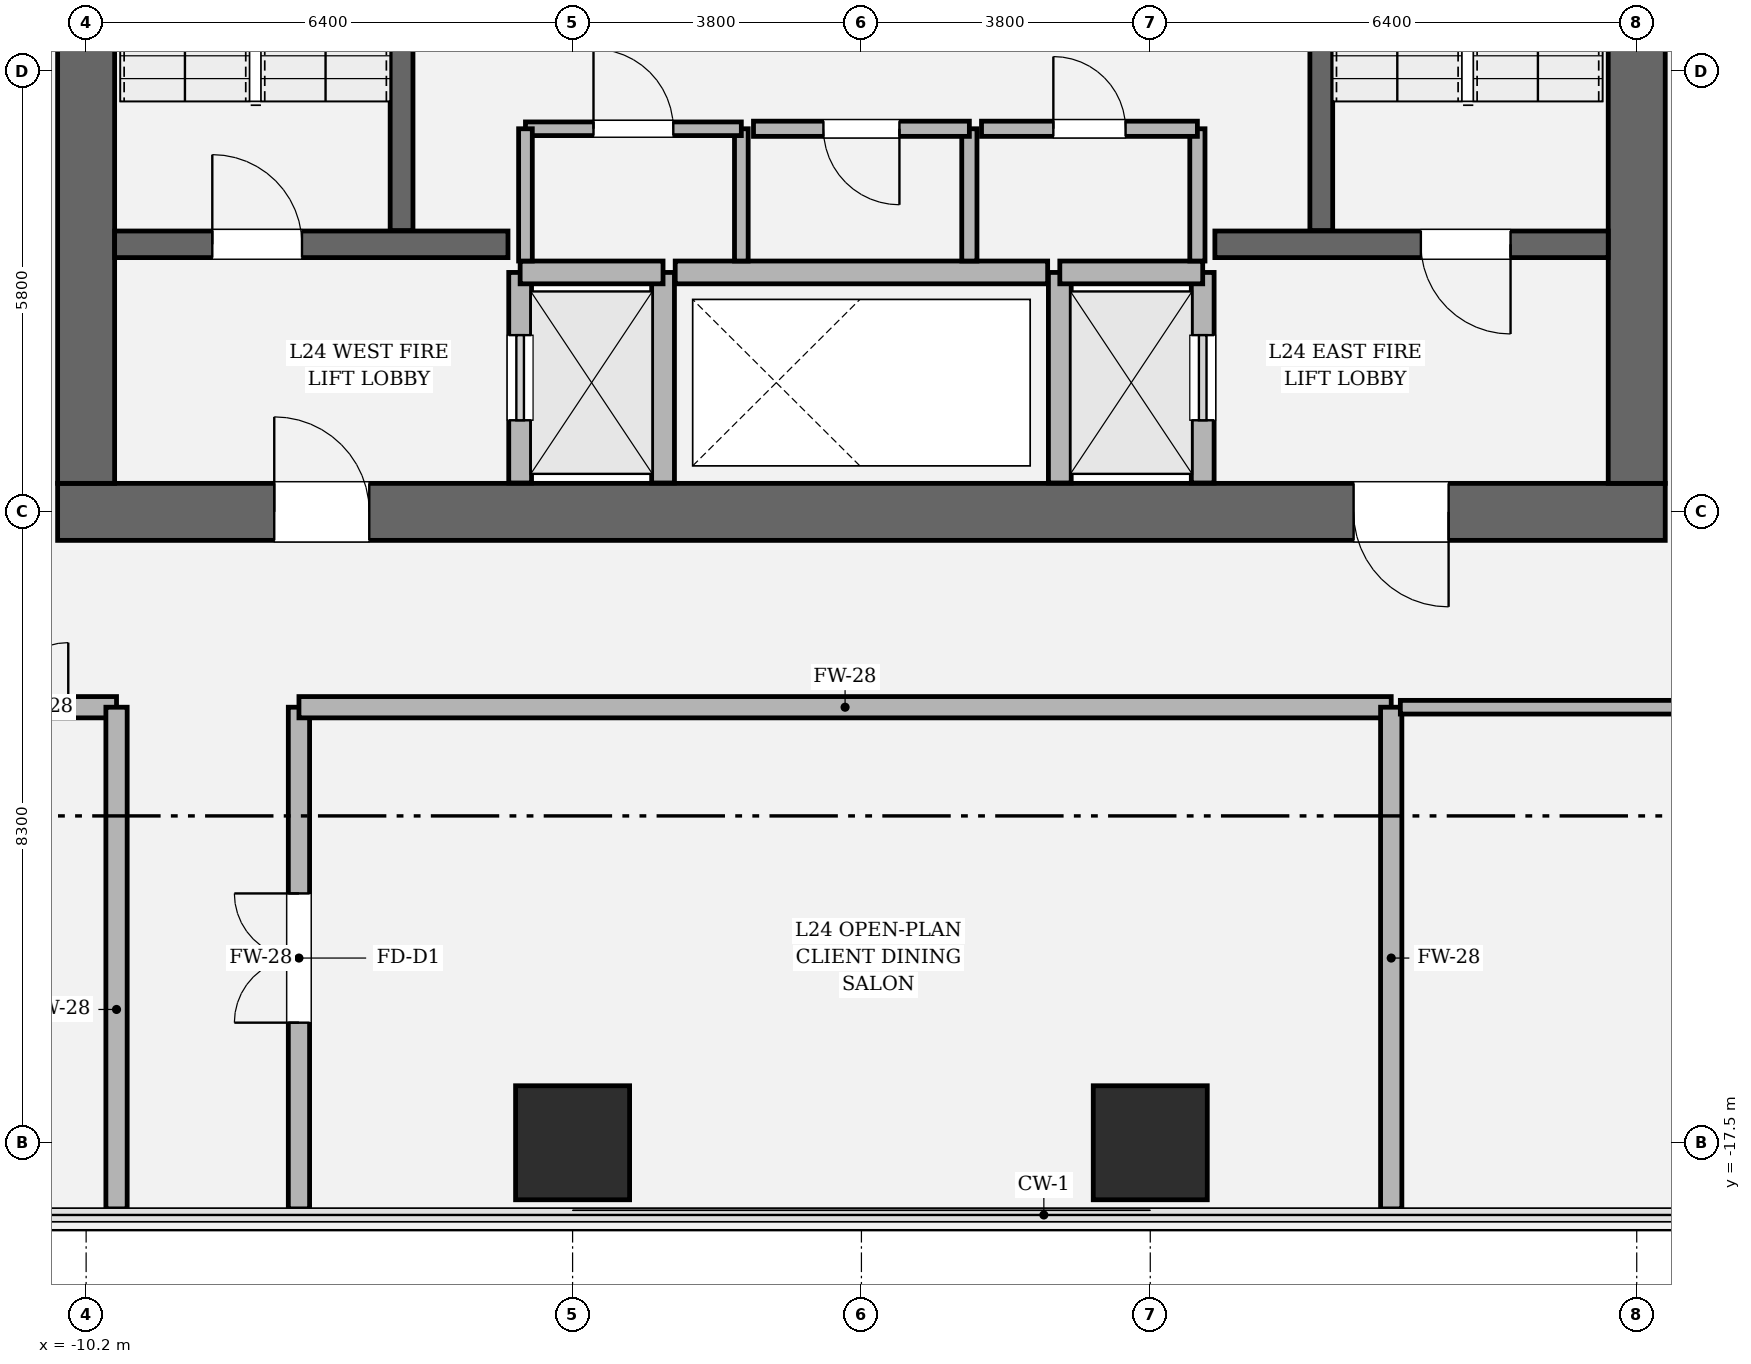
"""IFC4 building model, lengths in metres.
Left out: names, types, materials, properties, quantities, classifications, styles, units other than length and angle.
Written with IfcOpenShell. Run it as: python <this file> out.ifc"""

import sys

from ifc_helpers import new_model, si_unit, direction, frame, frame_2d, origin, origin_2d, place, context, subcontext, project, spatial, rectangle, hollow_rectangle, extrude, element, fill, save


model = new_model("IFC4")
c1 = context("Model", 3, precision=1e-05, world=origin(), true_north=direction((0.0, 1.0)))
c2 = subcontext(c1, "Body", "Model", "MODEL_VIEW")
j1 = project(units=[si_unit("LENGTHUNIT", "METRE"), si_unit("PLANEANGLEUNIT", "RADIAN")], contexts=[c1])
p1 = place(None, origin())
s1 = spatial("IfcSite", under=j1, at=p1, CompositionType="ELEMENT")
p2 = place(p1, origin())
s2 = spatial("IfcBuilding", under=s1, at=p2, CompositionType="ELEMENT")
p3 = place(p2, frame((0.0, 0.0, 105.15)))
s3 = spatial("IfcBuildingStorey", under=s2, at=p3, CompositionType="ELEMENT", Elevation=105.15)
p4 = place(p3, frame((10.575, -9.2, 0.0), z_axis=(0.0, 0.0, 1.0), x_axis=(-1.0, 0.0, 0.0)))
e1 = element("IfcWall", 1, at=p4, inside=s3, PredefinedType="SHEAR", context=c2, shape_type="SweptSolid", body=[
    extrude(rectangle(XDim=21.15, YDim=0.75, at=frame_2d((10.575, 0.0))), origin(), (0.0, 0.0, 1.0), 4.05),
])
p5 = place(p4, frame((2.85, 0.0, 0.0)))
e2 = element("IfcOpeningElement", 2, at=p5, cuts=e1, PredefinedType="OPENING", context=c2, shape_type="SweptSolid", body=[
    extrude(rectangle(XDim=1.25, YDim=2.25, at=frame_2d((0.625, 1.125))), frame((0.0, 0.385, 0.0), z_axis=(0.0, -1.0, 0.0), x_axis=(1.0, 0.0, 0.0)), (0.0, 0.0, 1.0), 0.77),
])
p6 = place(p4, frame((17.05, 0.0, 0.0)))
e3 = element("IfcOpeningElement", 3, at=p6, cuts=e1, PredefinedType="OPENING", context=c2, shape_type="SweptSolid", body=[
    extrude(rectangle(XDim=1.25, YDim=2.25, at=frame_2d((0.625, 1.125))), frame((0.0, 0.385, 0.0), z_axis=(0.0, -1.0, 0.0), x_axis=(1.0, 0.0, 0.0)), (0.0, 0.0, 1.0), 0.77),
])
p7 = place(p3, frame((-10.2, -8.825, 0.0), z_axis=(0.0, 0.0, 1.0), x_axis=(0.0, 1.0, 0.0)))
e4 = element("IfcWall", 4, at=p7, inside=s3, PredefinedType="SHEAR", context=c2, shape_type="SweptSolid", body=[
    extrude(rectangle(XDim=17.65, YDim=0.75, at=frame_2d((8.825, 0.0))), origin(), (0.0, 0.0, 1.0), 4.05),
])
p8 = place(p7, frame((12.615, 0.0, 0.0)))
e5 = element("IfcOpeningElement", 5, at=p8, cuts=e4, PredefinedType="OPENING", context=c2, shape_type="SweptSolid", body=[
    extrude(rectangle(XDim=1.18, YDim=2.2, at=frame_2d((0.59, 1.1))), frame((0.0, 0.385, 0.0), z_axis=(0.0, -1.0, 0.0), x_axis=(1.0, 0.0, 0.0)), (0.0, 0.0, 1.0), 0.77),
])
p9 = place(p3, frame((10.2, 8.825, 0.0), z_axis=(0.0, 0.0, 1.0), x_axis=(0.0, -1.0, 0.0)))
e6 = element("IfcWall", 6, at=p9, inside=s3, PredefinedType="SHEAR", context=c2, shape_type="SweptSolid", body=[
    extrude(rectangle(XDim=17.65, YDim=0.75, at=frame_2d((8.825, 0.0))), origin(), (0.0, 0.0, 1.0), 4.05),
])
p10 = place(p9, frame((3.855, 0.0, 0.0)))
e7 = element("IfcOpeningElement", 7, at=p10, cuts=e6, PredefinedType="OPENING", context=c2, shape_type="SweptSolid", body=[
    extrude(rectangle(XDim=1.18, YDim=2.2, at=frame_2d((0.59, 1.1))), frame((0.0, 0.385, 0.0), z_axis=(0.0, -1.0, 0.0), x_axis=(1.0, 0.0, 0.0)), (0.0, 0.0, 1.0), 0.77),
])
for number, where, z_axis, x_axis in (
    (8, (-6.05, -5.5, 0.0), (0.0, 0.0, 1.0), (0.0, 1.0, 0.0)),
    (9, (6.05, 3.45, 0.0), (0.0, 0.0, 1.0), (0.0, -1.0, 0.0)),
):
    element("IfcWall", number, at=place(p3, frame(where, z_axis=z_axis, x_axis=x_axis)), inside=s3, PredefinedType="SOLIDWALL", context=c2, shape_type="SweptSolid", body=[
        extrude(rectangle(XDim=8.95, YDim=0.3, at=frame_2d((4.475, 0.0))), origin(), (0.0, 0.0, 1.0), 4.05),
    ])
p11 = place(p3, frame((-9.825, -5.68, 0.0), z_axis=(0.0, 0.0, 1.0), x_axis=(1.0, 0.0, 0.0)))
e10 = element("IfcWall", 10, at=p11, inside=s3, PredefinedType="SOLIDWALL", context=c2, shape_type="SweptSolid", body=[
    extrude(rectangle(XDim=5.175, YDim=0.35, at=frame_2d((2.587, 0.0))), origin(), (0.0, 0.0, 1.0), 4.05),
])
p12 = place(p11, frame((1.285, 0.0, 0.0)))
e11 = element("IfcOpeningElement", 11, at=p12, cuts=e10, PredefinedType="OPENING", context=c2, shape_type="SweptSolid", body=[
    extrude(rectangle(XDim=1.18, YDim=2.2, at=frame_2d((0.59, 1.1))), frame((0.0, 0.185, 0.0), z_axis=(0.0, -1.0, 0.0), x_axis=(1.0, 0.0, 0.0)), (0.0, 0.0, 1.0), 0.37),
])
p13 = place(p3, frame((4.65, -5.68, 0.0), z_axis=(0.0, 0.0, 1.0), x_axis=(1.0, 0.0, 0.0)))
e12 = element("IfcWall", 12, at=p13, inside=s3, PredefinedType="SOLIDWALL", context=c2, shape_type="SweptSolid", body=[
    extrude(rectangle(XDim=5.175, YDim=0.35, at=frame_2d((2.587, 0.0))), origin(), (0.0, 0.0, 1.0), 4.05),
])
p14 = place(p13, frame((2.71, 0.0, 0.0)))
e13 = element("IfcOpeningElement", 13, at=p14, cuts=e12, PredefinedType="OPENING", context=c2, shape_type="SweptSolid", body=[
    extrude(rectangle(XDim=1.18, YDim=2.2, at=frame_2d((0.59, 1.1))), frame((0.0, 0.185, 0.0), z_axis=(0.0, -1.0, 0.0), x_axis=(1.0, 0.0, 0.0)), (0.0, 0.0, 1.0), 0.37),
])
for number, where, z_axis, x_axis in (
    (14, (-3.8, -17.5, 0.0), (0.0, 0.0, 1.0), (1.0, 0.0, 0.0)),
    (15, (3.8, -17.5, 0.0), (0.0, 0.0, 1.0), (1.0, 0.0, 0.0)),
):
    element("IfcColumn", number, at=place(p3, frame(where, z_axis=z_axis, x_axis=x_axis)), inside=s3, PredefinedType="COLUMN", context=c2, shape_type="SweptSolid", body=[
        extrude(hollow_rectangle(XDim=1.5, YDim=1.5, WallThickness=0.045, at=origin_2d()), origin(), (0.0, 0.0, 1.0), 4.05),
    ])
p15 = place(p3, frame((-4.49, -8.82, 0.0), z_axis=(0.0, 0.0, 1.0), x_axis=(0.0, 1.0, 0.0)))
e16 = element("IfcWall", 16, at=p15, inside=s3, PredefinedType="SOLIDWALL", context=c2, shape_type="SweptSolid", body=[
    extrude(rectangle(XDim=2.77, YDim=0.3, at=frame_2d((1.385, 0.0))), origin(), (0.0, 0.0, 1.0), 3.81),
])
p16 = place(p15, frame((0.825, 0.0, 0.0)))
e17 = element("IfcOpeningElement", 17, at=p16, cuts=e16, PredefinedType="OPENING", context=c2, shape_type="SweptSolid", body=[
    extrude(rectangle(XDim=1.12, YDim=2.25, at=frame_2d((0.56, 1.125))), frame((0.0, 0.16, 0.0), z_axis=(0.0, -1.0, 0.0), x_axis=(1.0, 0.0, 0.0)), (0.0, 0.0, 1.0), 0.32),
])
p17 = place(p3, frame((-2.61, -8.82, 0.0), z_axis=(0.0, 0.0, 1.0), x_axis=(0.0, 1.0, 0.0)))
e18 = element("IfcWall", 18, at=p17, inside=s3, PredefinedType="SOLIDWALL", context=c2, shape_type="SweptSolid", body=[
    extrude(rectangle(XDim=2.77, YDim=0.3, at=frame_2d((1.385, 0.0))), origin(), (0.0, 0.0, 1.0), 3.81),
])
p18 = place(p3, frame((-4.49, -6.05, 0.0), z_axis=(0.0, 0.0, 1.0), x_axis=(1.0, 0.0, 0.0)))
e19 = element("IfcWall", 19, at=p18, inside=s3, PredefinedType="SOLIDWALL", context=c2, shape_type="SweptSolid", body=[
    extrude(rectangle(XDim=1.88, YDim=0.3, at=frame_2d((0.94, 0.0))), origin(), (0.0, 0.0, 1.0), 3.81),
])
p19 = place(p3, frame((4.49, -8.82, 0.0), z_axis=(0.0, 0.0, 1.0), x_axis=(0.0, 1.0, 0.0)))
e20 = element("IfcWall", 20, at=p19, inside=s3, PredefinedType="SOLIDWALL", context=c2, shape_type="SweptSolid", body=[
    extrude(rectangle(XDim=2.77, YDim=0.3, at=frame_2d((1.385, 0.0))), origin(), (0.0, 0.0, 1.0), 3.81),
])
p20 = place(p19, frame((0.825, 0.0, 0.0)))
e21 = element("IfcOpeningElement", 21, at=p20, cuts=e20, PredefinedType="OPENING", context=c2, shape_type="SweptSolid", body=[
    extrude(rectangle(XDim=1.12, YDim=2.25, at=frame_2d((0.56, 1.125))), frame((0.0, 0.16, 0.0), z_axis=(0.0, -1.0, 0.0), x_axis=(1.0, 0.0, 0.0)), (0.0, 0.0, 1.0), 0.32),
])
p21 = place(p3, frame((2.61, -8.82, 0.0), z_axis=(0.0, 0.0, 1.0), x_axis=(0.0, 1.0, 0.0)))
e22 = element("IfcWall", 22, at=p21, inside=s3, PredefinedType="SOLIDWALL", context=c2, shape_type="SweptSolid", body=[
    extrude(rectangle(XDim=2.77, YDim=0.3, at=frame_2d((1.385, 0.0))), origin(), (0.0, 0.0, 1.0), 3.81),
])
p22 = place(p3, frame((2.61, -6.05, 0.0), z_axis=(0.0, 0.0, 1.0), x_axis=(1.0, 0.0, 0.0)))
e23 = element("IfcWall", 23, at=p22, inside=s3, PredefinedType="SOLIDWALL", context=c2, shape_type="SweptSolid", body=[
    extrude(rectangle(XDim=1.88, YDim=0.3, at=frame_2d((0.94, 0.0))), origin(), (0.0, 0.0, 1.0), 3.81),
])
p23 = place(p3, frame((-2.45, -6.05, 0.0), z_axis=(0.0, 0.0, 1.0), x_axis=(1.0, 0.0, 0.0)))
e24 = element("IfcWall", 24, at=p23, inside=s3, PredefinedType="SOLIDWALL", context=c2, shape_type="SweptSolid", body=[
    extrude(rectangle(XDim=4.9, YDim=0.3, at=frame_2d((2.45, 0.0))), origin(), (0.0, 0.0, 1.0), 3.81),
])
p24 = place(p3, frame((-1.58, -5.9, 0.0), z_axis=(0.0, 0.0, 1.0), x_axis=(0.0, 1.0, 0.0)))
e25 = element("IfcWall", 25, at=p24, inside=s3, PredefinedType="PARTITIONING", context=c2, shape_type="SweptSolid", body=[
    extrude(rectangle(XDim=1.74, YDim=0.18, at=frame_2d((0.87, 0.0))), origin(), (0.0, 0.0, 1.0), 3.81),
])
p25 = place(p3, frame((-1.58, -4.16, 0.0), z_axis=(0.0, 0.0, 1.0), x_axis=(-1.0, 0.0, 0.0)))
e26 = element("IfcWall", 26, at=p25, inside=s3, PredefinedType="PARTITIONING", context=c2, shape_type="SweptSolid", body=[
    extrude(rectangle(XDim=2.84, YDim=0.18, at=frame_2d((1.42, 0.0))), origin(), (0.0, 0.0, 1.0), 3.81),
])
p26 = place(p25, frame((0.895, 0.0, 0.0)))
e27 = element("IfcOpeningElement", 27, at=p26, cuts=e26, PredefinedType="OPENING", context=c2, shape_type="SweptSolid", body=[
    extrude(rectangle(XDim=1.05, YDim=2.2, at=frame_2d((0.525, 1.1))), frame((0.0, 0.1, 0.0), z_axis=(0.0, -1.0, 0.0), x_axis=(1.0, 0.0, 0.0)), (0.0, 0.0, 1.0), 0.2),
])
p27 = place(p3, frame((-4.42, -4.16, 0.0), z_axis=(0.0, 0.0, 1.0), x_axis=(0.0, -1.0, 0.0)))
e28 = element("IfcWall", 28, at=p27, inside=s3, PredefinedType="PARTITIONING", context=c2, shape_type="SweptSolid", body=[
    extrude(rectangle(XDim=1.74, YDim=0.18, at=frame_2d((0.87, 0.0))), origin(), (0.0, 0.0, 1.0), 3.81),
])
p28 = place(p3, frame((1.42, -5.9, 0.0), z_axis=(0.0, 0.0, 1.0), x_axis=(0.0, 1.0, 0.0)))
e29 = element("IfcWall", 29, at=p28, inside=s3, PredefinedType="SOLIDWALL", context=c2, shape_type="SweptSolid", body=[
    extrude(rectangle(XDim=1.74, YDim=0.2, at=frame_2d((0.87, 0.0))), origin(), (0.0, 0.0, 1.0), 3.81),
])
p29 = place(p3, frame((1.42, -4.16, 0.0), z_axis=(0.0, 0.0, 1.0), x_axis=(-1.0, 0.0, 0.0)))
e30 = element("IfcWall", 30, at=p29, inside=s3, PredefinedType="SOLIDWALL", context=c2, shape_type="SweptSolid", body=[
    extrude(rectangle(XDim=2.84, YDim=0.2, at=frame_2d((1.42, 0.0))), origin(), (0.0, 0.0, 1.0), 3.81),
])
p30 = place(p29, frame((0.92, 0.0, 0.0)))
e31 = element("IfcOpeningElement", 31, at=p30, cuts=e30, PredefinedType="OPENING", context=c2, shape_type="SweptSolid", body=[
    extrude(rectangle(XDim=1.0, YDim=2.15, at=frame_2d((0.5, 1.075))), frame((0.0, 0.11, 0.0), z_axis=(0.0, -1.0, 0.0), x_axis=(1.0, 0.0, 0.0)), (0.0, 0.0, 1.0), 0.22),
])
p31 = place(p3, frame((4.42, -5.9, 0.0), z_axis=(0.0, 0.0, 1.0), x_axis=(0.0, 1.0, 0.0)))
e32 = element("IfcWall", 32, at=p31, inside=s3, PredefinedType="SOLIDWALL", context=c2, shape_type="SweptSolid", body=[
    extrude(rectangle(XDim=1.74, YDim=0.2, at=frame_2d((0.87, 0.0))), origin(), (0.0, 0.0, 1.0), 3.81),
])
p32 = place(p3, frame((4.42, -4.16, 0.0), z_axis=(0.0, 0.0, 1.0), x_axis=(-1.0, 0.0, 0.0)))
e33 = element("IfcWall", 33, at=p32, inside=s3, PredefinedType="SOLIDWALL", context=c2, shape_type="SweptSolid", body=[
    extrude(rectangle(XDim=2.84, YDim=0.2, at=frame_2d((1.42, 0.0))), origin(), (0.0, 0.0, 1.0), 3.81),
])
p33 = place(p32, frame((0.945, 0.0, 0.0)))
e34 = element("IfcOpeningElement", 34, at=p33, cuts=e33, PredefinedType="OPENING", context=c2, shape_type="SweptSolid", body=[
    extrude(rectangle(XDim=0.95, YDim=2.15, at=frame_2d((0.475, 1.075))), frame((0.0, 0.11, 0.0), z_axis=(0.0, -1.0, 0.0), x_axis=(1.0, 0.0, 0.0)), (0.0, 0.0, 1.0), 0.22),
])
p34 = place(p3, frame((-7.4, -18.37, 0.0), z_axis=(0.0, 0.0, 1.0), x_axis=(0.0, 1.0, 0.0)))
e35 = element("IfcWall", 35, at=p34, inside=s3, PredefinedType="SOLIDWALL", context=c2, shape_type="SweptSolid", body=[
    extrude(rectangle(XDim=6.6, YDim=0.28, at=frame_2d((3.3, 0.0))), origin(), (0.0, 0.0, 1.0), 2.484),
])
p35 = place(p34, frame((2.45, 0.0, 0.0)))
e36 = element("IfcOpeningElement", 36, at=p35, cuts=e35, PredefinedType="OPENING", context=c2, shape_type="SweptSolid", body=[
    extrude(rectangle(XDim=1.7, YDim=2.3, at=frame_2d((0.85, 1.15))), frame((0.0, 0.15, 0.0), z_axis=(0.0, -1.0, 0.0), x_axis=(1.0, 0.0, 0.0)), (0.0, 0.0, 1.0), 0.3),
])
p36 = place(p3, frame((-7.4, -11.77, 0.0), z_axis=(0.0, 0.0, 1.0), x_axis=(1.0, 0.0, 0.0)))
e37 = element("IfcWall", 37, at=p36, inside=s3, PredefinedType="SOLIDWALL", context=c2, shape_type="SweptSolid", body=[
    extrude(rectangle(XDim=14.37, YDim=0.28, at=frame_2d((7.185, 0.0))), origin(), (0.0, 0.0, 1.0), 2.484),
])
p37 = place(p3, frame((6.97, -11.77, 0.0), z_axis=(0.0, 0.0, 1.0), x_axis=(0.0, -1.0, 0.0)))
e38 = element("IfcWall", 38, at=p37, inside=s3, PredefinedType="SOLIDWALL", context=c2, shape_type="SweptSolid", body=[
    extrude(rectangle(XDim=6.6, YDim=0.28, at=frame_2d((3.3, 0.0))), origin(), (0.0, 0.0, 1.0), 2.484),
])
p38 = place(p3, frame((-12.77, -11.77, 0.0), z_axis=(0.0, 0.0, 1.0), x_axis=(1.0, 0.0, 0.0)))
e39 = element("IfcWall", 39, at=p38, inside=s3, PredefinedType="SOLIDWALL", context=c2, shape_type="SweptSolid", body=[
    extrude(rectangle(XDim=2.97, YDim=0.28, at=frame_2d((1.485, 0.0))), origin(), (0.0, 0.0, 1.0), 2.484),
])
p39 = place(p38, frame((0.635, 0.0, 0.0)))
e40 = element("IfcOpeningElement", 40, at=p39, cuts=e39, PredefinedType="OPENING", context=c2, shape_type="SweptSolid", body=[
    extrude(rectangle(XDim=1.7, YDim=2.3, at=frame_2d((0.85, 1.15))), frame((0.0, 0.15, 0.0), z_axis=(0.0, -1.0, 0.0), x_axis=(1.0, 0.0, 0.0)), (0.0, 0.0, 1.0), 0.3),
])
p40 = place(p3, frame((-9.8, -11.77, 0.0), z_axis=(0.0, 0.0, 1.0), x_axis=(0.0, -1.0, 0.0)))
e41 = element("IfcWall", 41, at=p40, inside=s3, PredefinedType="SOLIDWALL", context=c2, shape_type="SweptSolid", body=[
    extrude(rectangle(XDim=6.6, YDim=0.28, at=frame_2d((3.3, 0.0))), origin(), (0.0, 0.0, 1.0), 2.484),
])
p41 = place(p3, frame((7.09, -11.77, 0.0), z_axis=(0.0, 0.0, 1.0), x_axis=(1.0, 0.0, 0.0)))
e42 = element("IfcWall", 42, at=p41, inside=s3, PredefinedType="PARTITIONING", context=c2, shape_type="SweptSolid", body=[
    extrude(rectangle(XDim=10.33, YDim=0.18, at=frame_2d((5.165, 0.0))), origin(), (0.0, 0.0, 1.0), 2.484),
])
p42 = place(p41, frame((4.64, 0.0, 0.0)))
e43 = element("IfcOpeningElement", 43, at=p42, cuts=e42, PredefinedType="OPENING", context=c2, shape_type="SweptSolid", body=[
    extrude(rectangle(XDim=1.05, YDim=2.2, at=frame_2d((0.525, 1.1))), frame((0.0, 0.1, 0.0), z_axis=(0.0, -1.0, 0.0), x_axis=(1.0, 0.0, 0.0)), (0.0, 0.0, 1.0), 0.2),
])
p43 = place(p12, origin())
e44 = element("IfcDoor", 44, at=p43, inside=s3, OperationType="SINGLE_SWING_LEFT", PredefinedType="DOOR", context=c2, shape_type="SweptSolid", body=[
    extrude(rectangle(XDim=1.18, YDim=2.2, at=frame_2d((0.59, 1.1))), frame((0.0, 0.025, 0.0), z_axis=(0.0, -1.0, 0.0), x_axis=(1.0, 0.0, 0.0)), (0.0, 0.0, 1.0), 0.05),
])
fill(e11, e44)
p44 = place(p14, origin())
e45 = element("IfcDoor", 45, at=p44, inside=s3, OperationType="SINGLE_SWING_RIGHT", PredefinedType="DOOR", context=c2, shape_type="SweptSolid", body=[
    extrude(rectangle(XDim=1.18, YDim=2.2, at=frame_2d((0.59, 1.1))), frame((0.0, 0.025, 0.0), z_axis=(0.0, -1.0, 0.0), x_axis=(1.0, 0.0, 0.0)), (0.0, 0.0, 1.0), 0.05),
])
fill(e13, e45)
p45 = place(p5, origin())
e46 = element("IfcDoor", 46, at=p45, inside=s3, OperationType="SINGLE_SWING_LEFT", PredefinedType="DOOR", context=c2, shape_type="SweptSolid", body=[
    extrude(rectangle(XDim=1.25, YDim=2.25, at=frame_2d((0.625, 1.125))), frame((0.0, 0.025, 0.0), z_axis=(0.0, -1.0, 0.0), x_axis=(1.0, 0.0, 0.0)), (0.0, 0.0, 1.0), 0.05),
])
fill(e2, e46)
p46 = place(p6, origin())
e47 = element("IfcDoor", 47, at=p46, inside=s3, OperationType="SINGLE_SWING_RIGHT", PredefinedType="DOOR", context=c2, shape_type="SweptSolid", body=[
    extrude(rectangle(XDim=1.25, YDim=2.25, at=frame_2d((0.625, 1.125))), frame((0.0, 0.025, 0.0), z_axis=(0.0, -1.0, 0.0), x_axis=(1.0, 0.0, 0.0)), (0.0, 0.0, 1.0), 0.05),
])
fill(e3, e47)
p47 = place(p16, origin())
e48 = element("IfcDoor", 48, at=p47, inside=s3, OperationType="SLIDING_TO_LEFT", PredefinedType="DOOR", context=c2, shape_type="SweptSolid", body=[
    extrude(rectangle(XDim=1.12, YDim=2.25, at=frame_2d((0.56, 1.125))), frame((0.0, 0.025, 0.0), z_axis=(0.0, -1.0, 0.0), x_axis=(1.0, 0.0, 0.0)), (0.0, 0.0, 1.0), 0.05),
])
fill(e17, e48)
p48 = place(p20, origin())
e49 = element("IfcDoor", 49, at=p48, inside=s3, OperationType="SLIDING_TO_RIGHT", PredefinedType="DOOR", context=c2, shape_type="SweptSolid", body=[
    extrude(rectangle(XDim=1.12, YDim=2.25, at=frame_2d((0.56, 1.125))), frame((0.0, 0.025, 0.0), z_axis=(0.0, -1.0, 0.0), x_axis=(1.0, 0.0, 0.0)), (0.0, 0.0, 1.0), 0.05),
])
fill(e21, e49)
p49 = place(p26, origin())
e50 = element("IfcDoor", 50, at=p49, inside=s3, OperationType="SINGLE_SWING_RIGHT", PredefinedType="DOOR", context=c2, shape_type="SweptSolid", body=[
    extrude(rectangle(XDim=1.05, YDim=2.2, at=frame_2d((0.525, 1.1))), frame((0.0, 0.025, 0.0), z_axis=(0.0, -1.0, 0.0), x_axis=(1.0, 0.0, 0.0)), (0.0, 0.0, 1.0), 0.05),
])
fill(e27, e50)
p50 = place(p30, origin())
e51 = element("IfcDoor", 51, at=p50, inside=s3, OperationType="SINGLE_SWING_LEFT", PredefinedType="DOOR", context=c2, shape_type="SweptSolid", body=[
    extrude(rectangle(XDim=1.0, YDim=2.15, at=frame_2d((0.5, 1.075))), frame((0.0, 0.025, 0.0), z_axis=(0.0, -1.0, 0.0), x_axis=(1.0, 0.0, 0.0)), (0.0, 0.0, 1.0), 0.05),
])
fill(e31, e51)
p51 = place(p33, origin())
e52 = element("IfcDoor", 52, at=p51, inside=s3, OperationType="SINGLE_SWING_RIGHT", PredefinedType="DOOR", context=c2, shape_type="SweptSolid", body=[
    extrude(rectangle(XDim=0.95, YDim=2.15, at=frame_2d((0.475, 1.075))), frame((0.0, 0.025, 0.0), z_axis=(0.0, -1.0, 0.0), x_axis=(1.0, 0.0, 0.0)), (0.0, 0.0, 1.0), 0.05),
])
fill(e34, e52)
p52 = place(p35, origin())
e53 = element("IfcDoor", 53, at=p52, inside=s3, OperationType="DOUBLE_DOOR_SINGLE_SWING", PredefinedType="DOOR", context=c2, shape_type="SweptSolid", body=[
    extrude(rectangle(XDim=1.7, YDim=2.3, at=frame_2d((0.85, 1.15))), frame((0.0, 0.025, 0.0), z_axis=(0.0, -1.0, 0.0), x_axis=(1.0, 0.0, 0.0)), (0.0, 0.0, 1.0), 0.05),
])
fill(e36, e53)
p53 = place(p39, origin())
e54 = element("IfcDoor", 54, at=p53, inside=s3, OperationType="DOUBLE_DOOR_SINGLE_SWING", PredefinedType="DOOR", context=c2, shape_type="SweptSolid", body=[
    extrude(rectangle(XDim=1.7, YDim=2.3, at=frame_2d((0.85, 1.15))), frame((0.0, 0.025, 0.0), z_axis=(0.0, -1.0, 0.0), x_axis=(1.0, 0.0, 0.0)), (0.0, 0.0, 1.0), 0.05),
])
fill(e40, e54)
save(model, sys.argv[1])
